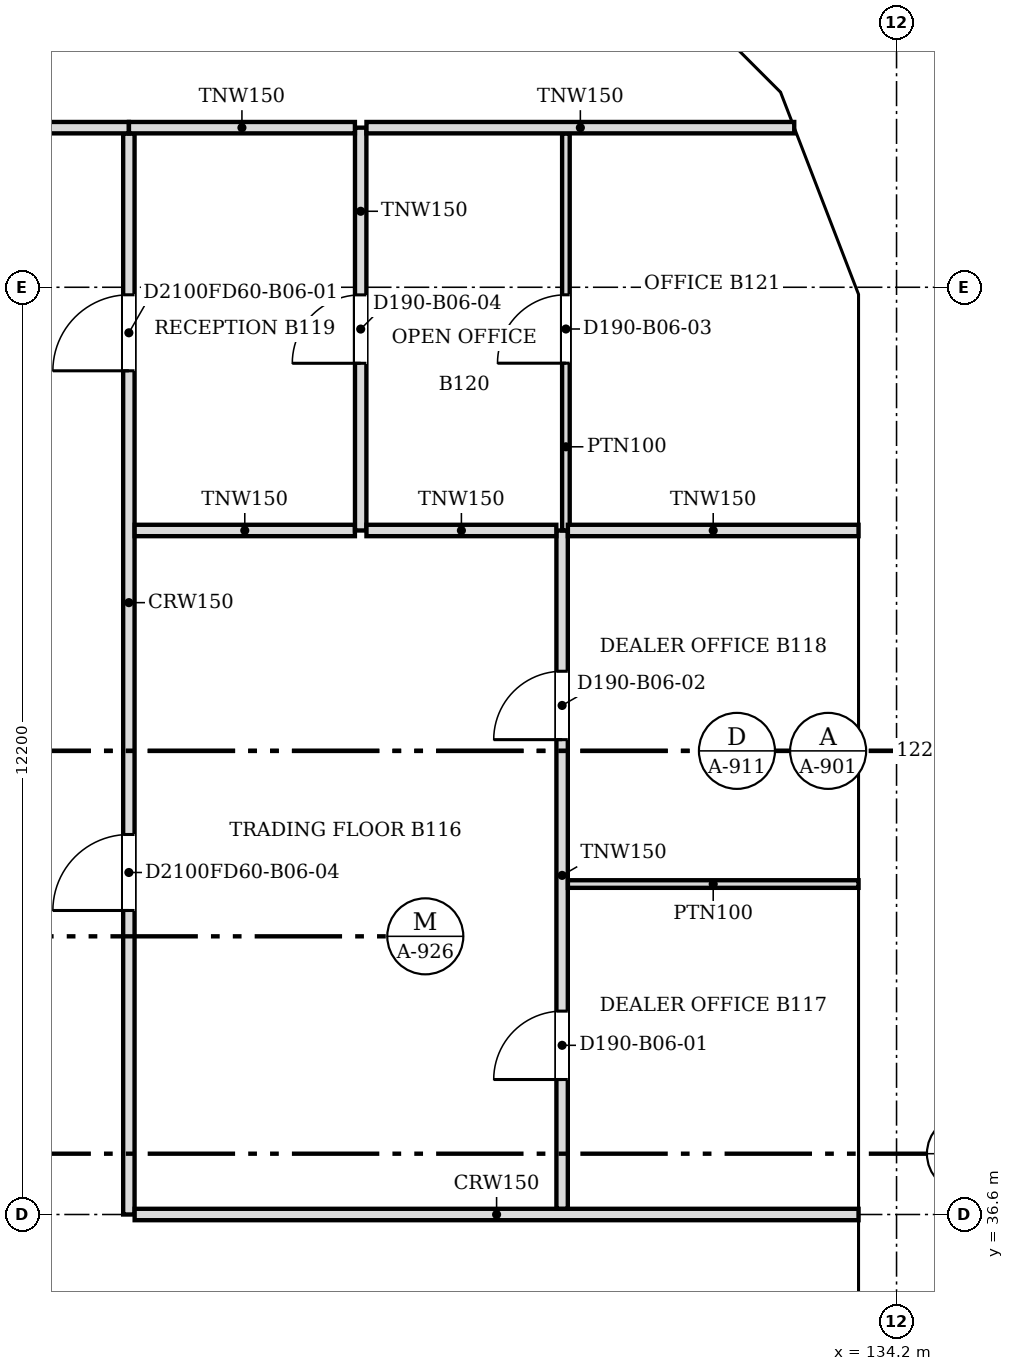
"""IFC4 building model, lengths in metres.
Left out: names, types, materials, properties, quantities, classifications, styles, units other than length and angle.
Written with IfcOpenShell. Run it as: python <this file> out.ifc"""

import sys

from ifc_helpers import new_model, si_unit, direction, frame, frame_2d, origin, place, context, subcontext, project, spatial, polyline, rectangle, outline, extrude, faceted_brep, source, transform, mapped, element, fill, save


model = new_model("IFC4")
c1 = context("Model", 3, precision=1e-05, world=origin(), true_north=direction((0.0, 1.0)))
c2 = subcontext(c1, "Body", "Model", "MODEL_VIEW")
j1 = project(units=[si_unit("LENGTHUNIT", "METRE"), si_unit("PLANEANGLEUNIT", "RADIAN")], contexts=[c1])
p1 = place(None, origin())
s1 = spatial("IfcSite", under=j1, at=p1, CompositionType="ELEMENT")
p2 = place(p1, origin())
s2 = spatial("IfcBuilding", under=s1, at=p2, CompositionType="ELEMENT")
p3 = place(p2, frame((0.0, 0.0, 56.2)))
s3 = spatial("IfcBuildingStorey", under=s2, at=p3, CompositionType="ELEMENT", Elevation=56.2)
m1 = source(origin(), c2, "Body", "SweptSolid", [
    extrude(outline(polyline([(3.05, 0.0), (6.1, 3.8), (3.05, 7.6), (0.0, 3.8), (3.05, 0.0)])), frame((0.0, 0.25, 0.0), z_axis=(0.0, -1.0, 0.0), x_axis=(1.0, 0.0, 0.0)), (0.0, 0.0, 1.0), 0.5),
])
p4 = place(p3, frame((133.95, 30.5, -3.8), z_axis=(0.0, 0.0, 1.0), x_axis=(0.0, 1.0, 0.0)))
e1 = element("IfcWall", 1, at=p4, inside=s3, PredefinedType="SOLIDWALL", context=c2, shape_type="MappedRepresentation", body=[
    mapped(m1, transform((0.0, 0.0, 0.0), scale=1.0)),
])
m2 = source(origin(), c2, "Body", "SweptSolid", [
    extrude(outline(polyline([(3.05, 0.399), (5.78, 3.8), (3.05, 7.201), (0.321, 3.8), (3.05, 0.399)])), frame((0.0, 0.26, 0.0), z_axis=(0.0, -1.0, 0.0), x_axis=(1.0, 0.0, 0.0)), (0.0, 0.0, 1.0), 0.52),
])
p5 = place(p4, origin())
e2 = element("IfcOpeningElement", 2, at=p5, cuts=e1, PredefinedType="OPENING", context=c2, shape_type="MappedRepresentation", body=[
    mapped(m2, transform((0.0, 0.0, 0.0), scale=1.0)),
])
m3 = source(origin(), c2, "Body", "Brep", [
    faceted_brep([(3.05, -0.25, 0.0), (6.1, -0.25, 3.8), (6.1, -0.25, 3.8), (3.05, -0.25, 7.6), (0.0, -0.25, 3.8), (0.0, 0.25, 3.8), (3.05, 0.25, 7.6), (6.1, 0.25, 3.8), (6.1, 0.25, 3.8), (3.05, 0.25, 0.0)], [[[0, 1, 2, 3, 4]], [[5, 6, 7, 8, 9]], [[9, 8, 1, 0]], [[7, 6, 3, 2]], [[6, 5, 4, 3]], [[5, 9, 0, 4]], [[1, 8, 7, 2]]]),
])
p6 = place(p3, frame((133.95, 36.6, -3.8), z_axis=(0.0, 0.0, 1.0), x_axis=(0.0, 1.0, 0.0)))
e3 = element("IfcWall", 3, at=p6, inside=s3, PredefinedType="SOLIDWALL", context=c2, shape_type="MappedRepresentation", body=[
    mapped(m3, transform((0.0, 0.0, 0.0), scale=1.0)),
])
p7 = place(p6, origin())
e4 = element("IfcOpeningElement", 4, at=p7, cuts=e3, PredefinedType="OPENING", context=c2, shape_type="MappedRepresentation", body=[
    mapped(m2, transform((0.0, 0.0, 0.0), scale=1.0)),
])
m4 = source(origin(), c2, "Body", "Brep", [
    faceted_brep([(3.05, -0.25, 0.0), (6.053, -0.25, 3.8), (3.05, -0.25, 7.6), (0.0, -0.25, 3.8), (0.0, 0.25, 3.8), (3.05, 0.25, 7.6), (6.007, 0.25, 3.859), (6.007, 0.25, 3.741), (3.05, 0.25, 0.0), (6.053, 0.0, 3.8)], [[[0, 1, 2, 3]], [[4, 5, 6, 7, 8]], [[8, 7, 9, 1, 0]], [[6, 5, 2, 1, 9]], [[5, 4, 3, 2]], [[4, 8, 0, 3]], [[9, 7, 6]]]),
])
p8 = place(p3, frame((133.95, 42.7, -3.8), z_axis=(0.0, 0.0, 1.0), x_axis=(0.0, 1.0, 0.0)))
e5 = element("IfcWall", 5, at=p8, inside=s3, PredefinedType="SOLIDWALL", context=c2, shape_type="MappedRepresentation", body=[
    mapped(m4, transform((0.0, 0.0, 0.0), scale=1.0)),
])
m5 = source(origin(), c2, "Body", "SweptSolid", [
    extrude(outline(polyline([(3.049, 0.401), (5.735, 3.8), (3.049, 7.199), (0.321, 3.8), (3.049, 0.401)])), frame((0.0, 0.26, 0.0), z_axis=(0.0, -1.0, 0.0), x_axis=(1.0, 0.0, 0.0)), (0.0, 0.0, 1.0), 0.52),
])
p9 = place(p8, origin())
e6 = element("IfcOpeningElement", 6, at=p9, cuts=e5, PredefinedType="OPENING", context=c2, shape_type="MappedRepresentation", body=[
    mapped(m5, transform((0.0, 0.0, 0.0), scale=1.0)),
])
m6 = source(origin(), c2, "Body", "Brep", [
    faceted_brep([(2.95, -0.25, 0.0), (3.003, -0.25, 0.068), (3.003, -0.25, 7.532), (2.95, -0.25, 7.6), (0.0, -0.25, 3.8), (0.047, 0.25, 3.86), (2.898, 0.25, 7.532), (2.898, 0.25, 0.068), (0.047, 0.25, 3.74), (2.95, 0.0, 0.0), (2.95, 0.0, 7.6), (0.0, 0.0, 3.8)], [[[0, 1, 2, 3, 4]], [[5, 6, 7, 8]], [[1, 0, 9]], [[10, 3, 2]], [[6, 5, 11, 4, 3, 10]], [[8, 7, 9, 0, 4, 11]], [[8, 11, 5]], [[1, 9, 7, 6, 10, 2]]]),
])
p10 = place(p3, frame((133.95, 48.753, -3.8), z_axis=(0.0, 0.0, 1.0), x_axis=(-0.359855894603, 0.933007896601, 0.0)))
e7 = element("IfcWall", 7, at=p10, inside=s3, PredefinedType="SOLIDWALL", context=c2, shape_type="MappedRepresentation", body=[
    mapped(m6, transform((0.0, 0.0, 0.0), scale=1.0)),
])
m7 = source(origin(), c2, "Body", "SweptSolid", [
    extrude(outline(polyline([(2.75, 6.935), (0.316, 3.8), (2.75, 0.665), (2.75, 6.935)])), frame((0.0, 0.26, 0.0), z_axis=(0.0, -1.0, 0.0), x_axis=(1.0, 0.0, 0.0)), (0.0, 0.0, 1.0), 0.52),
])
p11 = place(p10, origin())
e8 = element("IfcOpeningElement", 8, at=p11, cuts=e7, PredefinedType="OPENING", context=c2, shape_type="MappedRepresentation", body=[
    mapped(m7, transform((0.0, 0.0, 0.0), scale=1.0)),
])
m8 = source(origin(), c2, "Body", "Brep", [
    faceted_brep([(0.053, -0.25, 0.0), (2.997, -0.25, 3.8), (0.053, -0.25, 7.6), (0.0, -0.25, 7.532), (0.0, -0.25, 0.068), (0.106, 0.25, 7.532), (2.944, 0.25, 3.868), (2.944, 0.25, 3.732), (0.106, 0.25, 0.068), (2.997, 0.0, 3.8), (0.053, 0.0, 0.0), (0.053, 0.0, 7.6)], [[[0, 1, 2, 3, 4]], [[5, 6, 7, 8]], [[8, 7, 9, 1, 0, 10]], [[6, 5, 11, 2, 1, 9]], [[3, 2, 11]], [[10, 0, 4]], [[8, 10, 4, 3, 11, 5]], [[9, 7, 6]]]),
])
p12 = place(p3, frame((132.926, 51.469, -3.8), z_axis=(0.0, 0.0, 1.0), x_axis=(-0.707066050402, 0.707147509625, 0.0)))
e9 = element("IfcWall", 9, at=p12, inside=s3, PredefinedType="SOLIDWALL", context=c2, shape_type="MappedRepresentation", body=[
    mapped(m8, transform((0.0, 0.0, 0.0), scale=1.0)),
])
m9 = source(origin(), c2, "Body", "SweptSolid", [
    extrude(outline(polyline([(0.253, 0.667), (2.681, 3.8), (0.253, 6.934), (0.253, 0.667)])), frame((0.0, 0.26, 0.0), z_axis=(0.0, -1.0, 0.0), x_axis=(1.0, 0.0, 0.0)), (0.0, 0.0, 1.0), 0.52),
])
p13 = place(p12, origin())
e10 = element("IfcOpeningElement", 10, at=p13, cuts=e9, PredefinedType="OPENING", context=c2, shape_type="MappedRepresentation", body=[
    mapped(m9, transform((0.0, 0.0, 0.0), scale=1.0)),
])
p14 = place(p2, frame((0.0, 0.0, 60.0)))
s4 = spatial("IfcBuildingStorey", under=s2, at=p14, CompositionType="ELEMENT", Elevation=60.0)
p15 = place(p14, frame((133.95, 33.55, -3.8), z_axis=(0.0, 0.0, 1.0), x_axis=(0.0, 1.0, 0.0)))
e11 = element("IfcWall", 11, at=p15, inside=s4, PredefinedType="SOLIDWALL", context=c2, shape_type="MappedRepresentation", body=[
    mapped(m3, transform((0.0, 0.0, 0.0), scale=1.0)),
])
p16 = place(p15, origin())
e12 = element("IfcOpeningElement", 12, at=p16, cuts=e11, PredefinedType="OPENING", context=c2, shape_type="MappedRepresentation", body=[
    mapped(m2, transform((0.0, 0.0, 0.0), scale=1.0)),
])
p17 = place(p14, frame((133.95, 39.65, -3.8), z_axis=(0.0, 0.0, 1.0), x_axis=(0.0, 1.0, 0.0)))
e13 = element("IfcWall", 13, at=p17, inside=s4, PredefinedType="SOLIDWALL", context=c2, shape_type="MappedRepresentation", body=[
    mapped(m1, transform((0.0, 0.0, 0.0), scale=1.0)),
])
p18 = place(p17, origin())
e14 = element("IfcOpeningElement", 14, at=p18, cuts=e13, PredefinedType="OPENING", context=c2, shape_type="MappedRepresentation", body=[
    mapped(m2, transform((0.0, 0.0, 0.0), scale=1.0)),
])
m10 = source(origin(), c2, "Body", "Brep", [
    faceted_brep([(3.003, -0.25, 0.0), (3.05, -0.25, 0.06), (3.05, -0.25, 7.54), (3.003, -0.25, 7.6), (0.0, -0.25, 3.8), (0.0, 0.25, 3.8), (2.957, 0.25, 7.541), (2.957, 0.25, 0.059), (3.003, 0.0, 0.0), (3.003, 0.0, 7.6)], [[[0, 1, 2, 3, 4]], [[5, 6, 7]], [[1, 0, 8]], [[9, 3, 2]], [[6, 5, 4, 3, 9]], [[5, 7, 8, 0, 4]], [[1, 8, 7, 6, 9, 2]]]),
])
p19 = place(p14, frame((133.95, 45.75, -3.8), z_axis=(0.0, 0.0, 1.0), x_axis=(0.0, 1.0, 0.0)))
e15 = element("IfcWall", 15, at=p19, inside=s4, PredefinedType="SOLIDWALL", context=c2, shape_type="MappedRepresentation", body=[
    mapped(m10, transform((0.0, 0.0, 0.0), scale=1.0)),
])
m11 = source(origin(), c2, "Body", "SweptSolid", [
    extrude(outline(polyline([(2.803, 6.944), (0.319, 3.8), (2.803, 0.656), (2.803, 6.944)])), frame((0.0, 0.26, 0.0), z_axis=(0.0, -1.0, 0.0), x_axis=(1.0, 0.0, 0.0)), (0.0, 0.0, 1.0), 0.52),
])
p20 = place(p19, origin())
e16 = element("IfcOpeningElement", 16, at=p20, cuts=e15, PredefinedType="OPENING", context=c2, shape_type="MappedRepresentation", body=[
    mapped(m11, transform((0.0, 0.0, 0.0), scale=1.0)),
])
m12 = source(origin(), c2, "Body", "Brep", [
    faceted_brep([(0.047, -0.25, 0.0), (2.997, -0.25, 3.8), (0.047, -0.25, 7.6), (0.0, -0.25, 7.541), (0.0, -0.25, 0.059), (0.093, 0.25, 7.54), (2.944, 0.25, 3.868), (2.944, 0.25, 3.732), (0.093, 0.25, 0.06), (2.997, 0.0, 3.8), (0.047, 0.0, 0.0), (0.047, 0.0, 7.6)], [[[0, 1, 2, 3, 4]], [[5, 6, 7, 8]], [[8, 7, 9, 1, 0, 10]], [[6, 5, 11, 2, 1, 9]], [[3, 2, 11]], [[10, 0, 4]], [[8, 10, 4, 3, 11, 5]], [[9, 7, 6]]]),
])
p21 = place(p14, frame((133.967, 48.71, -3.8), z_axis=(0.0, 0.0, 1.0), x_axis=(-0.359901446078, 0.932990326376, 0.0)))
e17 = element("IfcWall", 17, at=p21, inside=s4, PredefinedType="SOLIDWALL", context=c2, shape_type="MappedRepresentation", body=[
    mapped(m12, transform((0.0, 0.0, 0.0), scale=1.0)),
])
m13 = source(origin(), c2, "Body", "SweptSolid", [
    extrude(outline(polyline([(0.247, 0.665), (2.681, 3.8), (0.247, 6.935), (0.247, 0.665)])), frame((0.0, 0.26, 0.0), z_axis=(0.0, -1.0, 0.0), x_axis=(1.0, 0.0, 0.0)), (0.0, 0.0, 1.0), 0.52),
])
p22 = place(p21, origin())
e18 = element("IfcOpeningElement", 18, at=p22, cuts=e17, PredefinedType="OPENING", context=c2, shape_type="MappedRepresentation", body=[
    mapped(m13, transform((0.0, 0.0, 0.0), scale=1.0)),
])
m14 = source(origin(), c2, "Body", "Brep", [
    faceted_brep([(2.944, -0.25, 0.0), (2.997, -0.25, 0.068), (2.997, -0.25, 7.532), (2.944, -0.25, 7.6), (0.0, -0.25, 3.8), (0.053, 0.25, 3.868), (2.891, 0.25, 7.532), (2.891, 0.25, 0.068), (0.053, 0.25, 3.732), (2.944, 0.0, 0.0), (2.944, 0.0, 7.6), (0.0, 0.0, 3.8)], [[[0, 1, 2, 3, 4]], [[5, 6, 7, 8]], [[1, 0, 9]], [[10, 3, 2]], [[6, 5, 11, 4, 3, 10]], [[8, 7, 9, 0, 4, 11]], [[8, 11, 5]], [[1, 9, 7, 6, 10, 2]]]),
])
p23 = place(p14, frame((132.888, 51.506, -3.8), z_axis=(0.0, 0.0, 1.0), x_axis=(-0.707147509625, 0.707066050402, 0.0)))
e19 = element("IfcWall", 19, at=p23, inside=s4, PredefinedType="SOLIDWALL", context=c2, shape_type="MappedRepresentation", body=[
    mapped(m14, transform((0.0, 0.0, 0.0), scale=1.0)),
])
m15 = source(origin(), c2, "Body", "SweptSolid", [
    extrude(outline(polyline([(2.744, 6.934), (0.316, 3.8), (2.744, 0.666), (2.744, 6.934)])), frame((0.0, 0.26, 0.0), z_axis=(0.0, -1.0, 0.0), x_axis=(1.0, 0.0, 0.0)), (0.0, 0.0, 1.0), 0.52),
])
p24 = place(p23, origin())
e20 = element("IfcOpeningElement", 20, at=p24, cuts=e19, PredefinedType="OPENING", context=c2, shape_type="MappedRepresentation", body=[
    mapped(m15, transform((0.0, 0.0, 0.0), scale=1.0)),
])
p25 = place(p3, frame((124.1, 50.824, 0.0), z_axis=(0.0, 0.0, 1.0), x_axis=(0.0, -1.0, 0.0)))
e21 = element("IfcWall", 21, at=p25, inside=s3, PredefinedType="PARTITIONING", context=c2, shape_type="SweptSolid", body=[
    extrude(rectangle(XDim=14.224, YDim=0.15, at=frame_2d((7.112, 0.0))), origin(), (0.0, 0.0, 1.0), 3.067),
])
m16 = source(origin(), c2, "Body", "SweptSolid", [
    extrude(rectangle(XDim=1.0, YDim=2.1, at=frame_2d((0.5, 1.05))), frame((0.0, 0.085, 0.0), z_axis=(0.0, -1.0, 0.0), x_axis=(1.0, 0.0, 0.0)), (0.0, 0.0, 1.0), 0.17),
])
p26 = place(p25, frame((2.123, 0.0, 0.0)))
e22 = element("IfcOpeningElement", 22, at=p26, cuts=e21, PredefinedType="OPENING", context=c2, shape_type="MappedRepresentation", body=[
    mapped(m16, transform((0.0, 0.0, 0.0), scale=1.0)),
])
p27 = place(p25, frame((9.224, 0.0, 0.0)))
e23 = element("IfcOpeningElement", 23, at=p27, cuts=e21, PredefinedType="OPENING", context=c2, shape_type="MappedRepresentation", body=[
    mapped(m16, transform((0.0, 0.0, 0.0), scale=1.0)),
])
p28 = place(p3, frame((124.176, 36.6, 0.0), z_axis=(0.0, 0.0, 1.0), x_axis=(1.0, 0.0, 0.0)))
e24 = element("IfcWall", 24, at=p28, inside=s3, PredefinedType="PARTITIONING", context=c2, shape_type="SweptSolid", body=[
    extrude(rectangle(XDim=9.524, YDim=0.15, at=frame_2d((4.762, 0.0))), origin(), (0.0, 0.0, 1.0), 3.067),
])
p29 = place(p3, frame((129.8, 45.6, 0.0), z_axis=(0.0, 0.0, 1.0), x_axis=(0.0, -1.0, 0.0)))
e25 = element("IfcWall", 25, at=p29, inside=s3, PredefinedType="PARTITIONING", context=c2, shape_type="SweptSolid", body=[
    extrude(rectangle(XDim=8.924, YDim=0.15, at=frame_2d((4.462, 0.0))), origin(), (0.0, 0.0, 1.0), 3.067),
])
m17 = source(origin(), c2, "Body", "SweptSolid", [
    extrude(rectangle(XDim=0.9, YDim=2.1, at=frame_2d((0.45, 1.05))), frame((0.0, 0.085, 0.0), z_axis=(0.0, -1.0, 0.0), x_axis=(1.0, 0.0, 0.0)), (0.0, 0.0, 1.0), 0.17),
])
p30 = place(p29, frame((6.324, 0.0, 0.0)))
e26 = element("IfcOpeningElement", 26, at=p30, cuts=e25, PredefinedType="OPENING", context=c2, shape_type="MappedRepresentation", body=[
    mapped(m17, transform((0.0, 0.0, 0.0), scale=1.0)),
])
p31 = place(p29, frame((1.852, 0.0, 0.0)))
e27 = element("IfcOpeningElement", 27, at=p31, cuts=e25, PredefinedType="OPENING", context=c2, shape_type="MappedRepresentation", body=[
    mapped(m17, transform((0.0, 0.0, 0.0), scale=1.0)),
])
p32 = place(p3, frame((129.876, 40.948, 0.0), z_axis=(0.0, 0.0, 1.0), x_axis=(1.0, 0.0, 0.0)))
e28 = element("IfcWall", 28, at=p32, inside=s3, PredefinedType="PARTITIONING", context=c2, shape_type="SweptSolid", body=[
    extrude(rectangle(XDim=3.824, YDim=0.1, at=frame_2d((1.912, 0.0))), origin(), (0.0, 0.0, 1.0), 3.067),
])
p33 = place(p3, frame((124.176, 45.6, 0.0), z_axis=(0.0, 0.0, 1.0), x_axis=(1.0, 0.0, 0.0)))
e29 = element("IfcWall", 29, at=p33, inside=s3, PredefinedType="PARTITIONING", context=c2, shape_type="SweptSolid", body=[
    extrude(rectangle(XDim=2.898, YDim=0.15, at=frame_2d((1.449, 0.0))), origin(), (0.0, 0.0, 1.0), 3.067),
])
p34 = place(p3, frame((127.15, 50.9, 0.0), z_axis=(0.0, 0.0, 1.0), x_axis=(0.0, -1.0, 0.0)))
e30 = element("IfcWall", 30, at=p34, inside=s3, PredefinedType="PARTITIONING", context=c2, shape_type="SweptSolid", body=[
    extrude(rectangle(XDim=5.3, YDim=0.15, at=frame_2d((2.65, 0.0))), origin(), (0.0, 0.0, 1.0), 3.067),
])
p35 = place(p34, frame((2.2, 0.0, 0.0)))
e31 = element("IfcOpeningElement", 31, at=p35, cuts=e30, PredefinedType="OPENING", context=c2, shape_type="MappedRepresentation", body=[
    mapped(m17, transform((0.0, 0.0, 0.0), scale=1.0)),
])
p36 = place(p3, frame((127.226, 45.6, 0.0), z_axis=(0.0, 0.0, 1.0), x_axis=(1.0, 0.0, 0.0)))
e32 = element("IfcWall", 32, at=p36, inside=s3, PredefinedType="PARTITIONING", context=c2, shape_type="SweptSolid", body=[
    extrude(rectangle(XDim=2.498, YDim=0.15, at=frame_2d((1.249, 0.0))), origin(), (0.0, 0.0, 1.0), 3.067),
])
p37 = place(p3, frame((129.85, 50.824, 0.0), z_axis=(0.0, 0.0, 1.0), x_axis=(0.0, -1.0, 0.0)))
e33 = element("IfcWall", 33, at=p37, inside=s3, PredefinedType="PARTITIONING", context=c2, shape_type="SweptSolid", body=[
    extrude(rectangle(XDim=5.223, YDim=0.1, at=frame_2d((2.611, 0.0))), origin(), (0.0, 0.0, 1.0), 3.067),
])
m18 = source(origin(), c2, "Body", "SweptSolid", [
    extrude(rectangle(XDim=0.9, YDim=2.1, at=frame_2d((0.45, 1.05))), frame((0.0, 0.06, 0.0), z_axis=(0.0, -1.0, 0.0), x_axis=(1.0, 0.0, 0.0)), (0.0, 0.0, 1.0), 0.12),
])
p38 = place(p37, frame((2.123, 0.0, 0.0)))
e34 = element("IfcOpeningElement", 34, at=p38, cuts=e33, PredefinedType="OPENING", context=c2, shape_type="MappedRepresentation", body=[
    mapped(m18, transform((0.0, 0.0, 0.0), scale=1.0)),
])
p39 = place(p3, frame((129.876, 45.6, 0.0), z_axis=(0.0, 0.0, 1.0), x_axis=(1.0, 0.0, 0.0)))
e35 = element("IfcWall", 35, at=p39, inside=s3, PredefinedType="PARTITIONING", context=c2, shape_type="SweptSolid", body=[
    extrude(rectangle(XDim=3.824, YDim=0.15, at=frame_2d((1.912, 0.0))), origin(), (0.0, 0.0, 1.0), 3.067),
])
p40 = place(p3, frame((108.5, 50.9, 0.0), z_axis=(0.0, 0.0, 1.0), x_axis=(1.0, 0.0, 0.0)))
e36 = element("IfcWall", 36, at=p40, inside=s3, PredefinedType="PARTITIONING", context=c2, shape_type="SweptSolid", body=[
    extrude(rectangle(XDim=15.6, YDim=0.15, at=frame_2d((7.8, 0.0))), origin(), (0.0, 0.0, 1.0), 3.067),
])
p41 = place(p40, frame((0.5, 0.0, 0.0)))
e37 = element("IfcOpeningElement", 37, at=p41, cuts=e36, PredefinedType="OPENING", context=c2, shape_type="MappedRepresentation", body=[
    mapped(m16, transform((0.0, 0.0, 0.0), scale=1.0)),
])
p42 = place(p40, frame((8.3, 0.0, 0.0)))
e38 = element("IfcOpeningElement", 38, at=p42, cuts=e36, PredefinedType="OPENING", context=c2, shape_type="MappedRepresentation", body=[
    mapped(m17, transform((0.0, 0.0, 0.0), scale=1.0)),
])
p43 = place(p3, frame((124.101, 50.9, 0.0), z_axis=(0.0, 0.0, 1.0), x_axis=(1.0, 0.0, 0.0)))
e39 = element("IfcWall", 39, at=p43, inside=s3, PredefinedType="PARTITIONING", context=c2, shape_type="SweptSolid", body=[
    extrude(rectangle(XDim=2.973, YDim=0.15, at=frame_2d((1.486, 0.0))), origin(), (0.0, 0.0, 1.0), 3.067),
])
p44 = place(p3, frame((127.226, 50.9, 0.0), z_axis=(0.0, 0.0, 1.0), x_axis=(1.0, 0.0, 0.0)))
e40 = element("IfcWall", 40, at=p44, inside=s3, PredefinedType="PARTITIONING", context=c2, shape_type="SweptSolid", body=[
    extrude(rectangle(XDim=5.628, YDim=0.15, at=frame_2d((2.814, 0.0))), origin(), (0.0, 0.0, 1.0), 3.067),
])
m19 = source(origin(), c2, "Body", "SweptSolid", [
    extrude(rectangle(XDim=0.9, YDim=2.1, at=frame_2d((0.45, 1.05))), frame((0.0, 0.025, 0.0), z_axis=(0.0, -1.0, 0.0), x_axis=(1.0, 0.0, 0.0)), (0.0, 0.0, 1.0), 0.05),
])
p45 = place(p30, origin())
e41 = element("IfcDoor", 41, at=p45, inside=s3, OperationType="SINGLE_SWING_RIGHT", PredefinedType="DOOR", context=c2, shape_type="MappedRepresentation", body=[
    mapped(m19, transform((0.0, 0.0, 0.0), scale=1.0)),
])
fill(e26, e41)
p46 = place(p31, origin())
e42 = element("IfcDoor", 42, at=p46, inside=s3, OperationType="SINGLE_SWING_RIGHT", PredefinedType="DOOR", context=c2, shape_type="MappedRepresentation", body=[
    mapped(m19, transform((0.0, 0.0, 0.0), scale=1.0)),
])
fill(e27, e42)
m20 = source(origin(), c2, "Body", "SweptSolid", [
    extrude(rectangle(XDim=1.0, YDim=2.1, at=frame_2d((0.5, 1.05))), frame((0.0, 0.025, 0.0), z_axis=(0.0, -1.0, 0.0), x_axis=(1.0, 0.0, 0.0)), (0.0, 0.0, 1.0), 0.05),
])
p47 = place(p26, origin())
e43 = element("IfcDoor", 43, at=p47, inside=s3, OperationType="SINGLE_SWING_RIGHT", PredefinedType="DOOR", context=c2, shape_type="MappedRepresentation", body=[
    mapped(m20, transform((0.0, 0.0, 0.0), scale=1.0)),
])
fill(e22, e43)
p48 = place(p38, origin())
e44 = element("IfcDoor", 44, at=p48, inside=s3, OperationType="SINGLE_SWING_RIGHT", PredefinedType="DOOR", context=c2, shape_type="MappedRepresentation", body=[
    mapped(m19, transform((0.0, 0.0, 0.0), scale=1.0)),
])
fill(e34, e44)
p49 = place(p35, origin())
e45 = element("IfcDoor", 45, at=p49, inside=s3, OperationType="SINGLE_SWING_RIGHT", PredefinedType="DOOR", context=c2, shape_type="MappedRepresentation", body=[
    mapped(m19, transform((0.0, 0.0, 0.0), scale=1.0)),
])
fill(e31, e45)
p50 = place(p27, origin())
e46 = element("IfcDoor", 46, at=p50, inside=s3, OperationType="SINGLE_SWING_RIGHT", PredefinedType="DOOR", context=c2, shape_type="MappedRepresentation", body=[
    mapped(m20, transform((0.0, 0.0, 0.0), scale=1.0)),
])
fill(e23, e46)
save(model, sys.argv[1])
